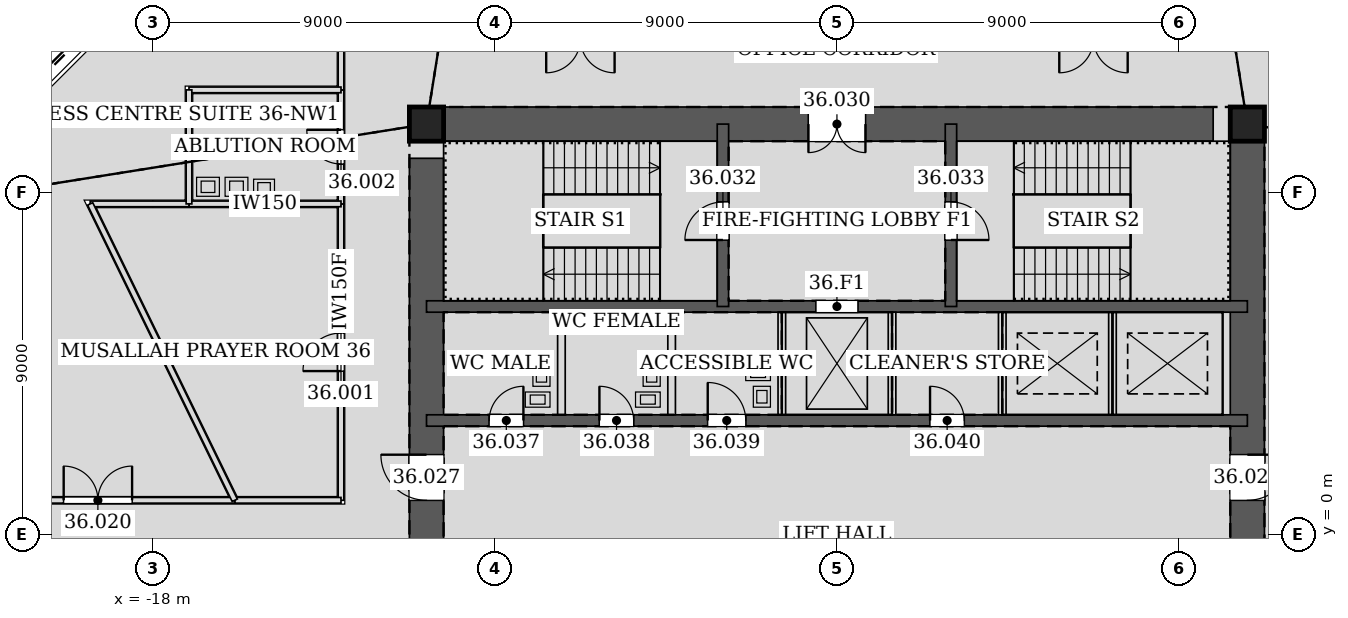
"""IFC4 building model, lengths in metres.
Left out: names, types, materials, properties, quantities, classifications, styles, units other than length and angle.
Written with IfcOpenShell. Run it as: python <this file> out.ifc"""

import sys

from ifc_helpers import new_model, si_unit, direction, frame, frame_2d, origin, origin_2d, place, context, subcontext, project, spatial, rectangle, hollow_rectangle, extrude, element, fill, save


model = new_model("IFC4")
c1 = context("Model", 3, precision=1e-05, world=origin(), true_north=direction((0.0, 1.0)))
c2 = subcontext(c1, "Body", "Model", "MODEL_VIEW")
j1 = project(units=[si_unit("LENGTHUNIT", "METRE"), si_unit("PLANEANGLEUNIT", "RADIAN")], contexts=[c1])
p1 = place(None, origin())
s1 = spatial("IfcSite", under=j1, at=p1, CompositionType="ELEMENT")
p2 = place(p1, origin())
s2 = spatial("IfcBuilding", under=s1, at=p2, CompositionType="ELEMENT")
p3 = place(p2, frame((0.0, 0.0, 159.6)))
s3 = spatial("IfcBuildingStorey", under=s2, at=p3, CompositionType="ELEMENT", Elevation=159.6)
for number, where, z_axis, x_axis in (
    (1, (10.8, 10.8, 0.0), (0.0, 0.0, 1.0), (1.0, 0.0, 0.0)),
    (2, (-10.8, 10.8, 0.0), (0.0, 0.0, 1.0), (1.0, 0.0, 0.0)),
):
    element("IfcColumn", number, at=place(p3, frame(where, z_axis=z_axis, x_axis=x_axis)), inside=s3, PredefinedType="COLUMN", context=c2, shape_type="SweptSolid", body=[
        extrude(hollow_rectangle(XDim=0.9, YDim=0.9, WallThickness=0.06, at=origin_2d()), origin(), (0.0, 0.0, 1.0), 4.2),
    ])
p4 = place(p3, frame((10.8, -10.8, 0.0), z_axis=(0.0, 0.0, 1.0), x_axis=(0.0, 1.0, 0.0)))
e3 = element("IfcWall", 3, at=p4, inside=s3, PredefinedType="SOLIDWALL", context=c2, shape_type="SweptSolid", body=[
    extrude(rectangle(XDim=21.6, YDim=0.9, at=frame_2d((10.8, 0.0))), origin(), (0.0, 0.0, 1.0), 4.2),
])
p5 = place(p4, frame((11.7, 0.0, 0.0)))
e4 = element("IfcOpeningElement", 4, at=p5, cuts=e3, PredefinedType="OPENING", context=c2, shape_type="SweptSolid", body=[
    extrude(rectangle(XDim=1.2, YDim=2.1, at=frame_2d((0.6, 1.05))), frame((0.0, 0.46, 0.0), z_axis=(0.0, -1.0, 0.0), x_axis=(1.0, 0.0, 0.0)), (0.0, 0.0, 1.0), 0.92),
])
p6 = place(p4, frame((8.7, 0.0, 0.0)))
e5 = element("IfcOpeningElement", 5, at=p6, cuts=e3, PredefinedType="OPENING", context=c2, shape_type="SweptSolid", body=[
    extrude(rectangle(XDim=1.2, YDim=2.1, at=frame_2d((0.6, 1.05))), frame((0.0, 0.46, 0.0), z_axis=(0.0, -1.0, 0.0), x_axis=(1.0, 0.0, 0.0)), (0.0, 0.0, 1.0), 0.92),
])
p7 = place(p3, frame((10.8, 10.8, 0.0), z_axis=(0.0, 0.0, 1.0), x_axis=(-1.0, 0.0, 0.0)))
e6 = element("IfcWall", 6, at=p7, inside=s3, PredefinedType="SOLIDWALL", context=c2, shape_type="SweptSolid", body=[
    extrude(rectangle(XDim=21.6, YDim=0.9, at=frame_2d((10.8, 0.0))), origin(), (0.0, 0.0, 1.0), 4.2),
])
p8 = place(p7, frame((10.05, 0.0, 0.0)))
e7 = element("IfcOpeningElement", 7, at=p8, cuts=e6, PredefinedType="OPENING", context=c2, shape_type="SweptSolid", body=[
    extrude(rectangle(XDim=1.5, YDim=2.1, at=frame_2d((0.75, 1.05))), frame((0.0, 0.46, 0.0), z_axis=(0.0, -1.0, 0.0), x_axis=(1.0, 0.0, 0.0)), (0.0, 0.0, 1.0), 0.92),
])
p9 = place(p3, frame((-10.8, 10.8, 0.0), z_axis=(0.0, 0.0, 1.0), x_axis=(0.0, -1.0, 0.0)))
e8 = element("IfcWall", 8, at=p9, inside=s3, PredefinedType="SOLIDWALL", context=c2, shape_type="SweptSolid", body=[
    extrude(rectangle(XDim=21.6, YDim=0.9, at=frame_2d((10.8, 0.0))), origin(), (0.0, 0.0, 1.0), 4.2),
])
p10 = place(p9, frame((8.7, 0.0, 0.0)))
e9 = element("IfcOpeningElement", 9, at=p10, cuts=e8, PredefinedType="OPENING", context=c2, shape_type="SweptSolid", body=[
    extrude(rectangle(XDim=1.2, YDim=2.1, at=frame_2d((0.6, 1.05))), frame((0.0, 0.46, 0.0), z_axis=(0.0, -1.0, 0.0), x_axis=(1.0, 0.0, 0.0)), (0.0, 0.0, 1.0), 0.92),
])
p11 = place(p9, frame((11.7, 0.0, 0.0)))
e10 = element("IfcOpeningElement", 10, at=p11, cuts=e8, PredefinedType="OPENING", context=c2, shape_type="SweptSolid", body=[
    extrude(rectangle(XDim=1.2, YDim=2.1, at=frame_2d((0.6, 1.05))), frame((0.0, 0.46, 0.0), z_axis=(0.0, -1.0, 0.0), x_axis=(1.0, 0.0, 0.0)), (0.0, 0.0, 1.0), 0.92),
])
p12 = place(p3, frame((-10.8, 3.0, 0.0), z_axis=(0.0, 0.0, 1.0), x_axis=(1.0, 0.0, 0.0)))
e11 = element("IfcWall", 11, at=p12, inside=s3, PredefinedType="SOLIDWALL", context=c2, shape_type="SweptSolid", body=[
    extrude(rectangle(XDim=21.6, YDim=0.3, at=frame_2d((10.8, 0.0))), origin(), (0.0, 0.0, 1.0), 4.2),
])
p13 = place(p12, frame((1.65, 0.0, 0.0)))
e12 = element("IfcOpeningElement", 12, at=p13, cuts=e11, PredefinedType="OPENING", context=c2, shape_type="SweptSolid", body=[
    extrude(rectangle(XDim=0.9, YDim=2.1, at=frame_2d((0.45, 1.05))), frame((0.0, 0.16, 0.0), z_axis=(0.0, -1.0, 0.0), x_axis=(1.0, 0.0, 0.0)), (0.0, 0.0, 1.0), 0.32),
])
p14 = place(p12, frame((4.55, 0.0, 0.0)))
e13 = element("IfcOpeningElement", 13, at=p14, cuts=e11, PredefinedType="OPENING", context=c2, shape_type="SweptSolid", body=[
    extrude(rectangle(XDim=0.9, YDim=2.1, at=frame_2d((0.45, 1.05))), frame((0.0, 0.16, 0.0), z_axis=(0.0, -1.0, 0.0), x_axis=(1.0, 0.0, 0.0)), (0.0, 0.0, 1.0), 0.32),
])
p15 = place(p12, frame((7.4, 0.0, 0.0)))
e14 = element("IfcOpeningElement", 14, at=p15, cuts=e11, PredefinedType="OPENING", context=c2, shape_type="SweptSolid", body=[
    extrude(rectangle(XDim=1.0, YDim=2.1, at=frame_2d((0.5, 1.05))), frame((0.0, 0.16, 0.0), z_axis=(0.0, -1.0, 0.0), x_axis=(1.0, 0.0, 0.0)), (0.0, 0.0, 1.0), 0.32),
])
p16 = place(p12, frame((13.25, 0.0, 0.0)))
e15 = element("IfcOpeningElement", 15, at=p16, cuts=e11, PredefinedType="OPENING", context=c2, shape_type="SweptSolid", body=[
    extrude(rectangle(XDim=0.9, YDim=2.1, at=frame_2d((0.45, 1.05))), frame((0.0, 0.16, 0.0), z_axis=(0.0, -1.0, 0.0), x_axis=(1.0, 0.0, 0.0)), (0.0, 0.0, 1.0), 0.32),
])
p17 = place(p3, frame((-10.8, 6.0, 0.0), z_axis=(0.0, 0.0, 1.0), x_axis=(1.0, 0.0, 0.0)))
e16 = element("IfcWall", 16, at=p17, inside=s3, PredefinedType="SOLIDWALL", context=c2, shape_type="SweptSolid", body=[
    extrude(rectangle(XDim=21.6, YDim=0.3, at=frame_2d((10.8, 0.0))), origin(), (0.0, 0.0, 1.0), 4.2),
])
p18 = place(p17, frame((10.25, 0.0, 0.0)))
e17 = element("IfcOpeningElement", 17, at=p18, cuts=e16, PredefinedType="OPENING", context=c2, shape_type="SweptSolid", body=[
    extrude(rectangle(XDim=1.1, YDim=2.1, at=frame_2d((0.55, 1.05))), frame((0.0, 0.16, 0.0), z_axis=(0.0, -1.0, 0.0), x_axis=(1.0, 0.0, 0.0)), (0.0, 0.0, 1.0), 0.32),
])
p19 = place(p3, frame((-3.0, 6.0, 0.0), z_axis=(0.0, 0.0, 1.0), x_axis=(0.0, 1.0, 0.0)))
e18 = element("IfcWall", 18, at=p19, inside=s3, PredefinedType="SOLIDWALL", context=c2, shape_type="SweptSolid", body=[
    extrude(rectangle(XDim=4.8, YDim=0.3, at=frame_2d((2.4, 0.0))), origin(), (0.0, 0.0, 1.0), 4.2),
])
p20 = place(p19, frame((1.75, 0.0, 0.0)))
e19 = element("IfcOpeningElement", 19, at=p20, cuts=e18, PredefinedType="OPENING", context=c2, shape_type="SweptSolid", body=[
    extrude(rectangle(XDim=1.0, YDim=2.1, at=frame_2d((0.5, 1.05))), frame((0.0, 0.16, 0.0), z_axis=(0.0, -1.0, 0.0), x_axis=(1.0, 0.0, 0.0)), (0.0, 0.0, 1.0), 0.32),
])
p21 = place(p3, frame((3.0, 6.0, 0.0), z_axis=(0.0, 0.0, 1.0), x_axis=(0.0, 1.0, 0.0)))
e20 = element("IfcWall", 20, at=p21, inside=s3, PredefinedType="SOLIDWALL", context=c2, shape_type="SweptSolid", body=[
    extrude(rectangle(XDim=4.8, YDim=0.3, at=frame_2d((2.4, 0.0))), origin(), (0.0, 0.0, 1.0), 4.2),
])
p22 = place(p21, frame((1.75, 0.0, 0.0)))
e21 = element("IfcOpeningElement", 21, at=p22, cuts=e20, PredefinedType="OPENING", context=c2, shape_type="SweptSolid", body=[
    extrude(rectangle(XDim=1.0, YDim=2.1, at=frame_2d((0.5, 1.05))), frame((0.0, 0.16, 0.0), z_axis=(0.0, -1.0, 0.0), x_axis=(1.0, 0.0, 0.0)), (0.0, 0.0, 1.0), 0.32),
])
p23 = place(p3, frame((-13.05, 8.701, 0.0), z_axis=(0.0, 0.0, 1.0), x_axis=(0.0, -1.0, 0.0)))
e22 = element("IfcWall", 22, at=p23, inside=s3, PredefinedType="PARTITIONING", context=c2, shape_type="SweptSolid", body=[
    extrude(rectangle(XDim=7.801, YDim=0.15, at=frame_2d((3.9, 0.0))), origin(), (0.0, 0.0, 1.0), 4.035),
])
p24 = place(p23, frame((3.4, 0.0, 0.0)))
e23 = element("IfcOpeningElement", 23, at=p24, cuts=e22, PredefinedType="OPENING", context=c2, shape_type="SweptSolid", body=[
    extrude(rectangle(XDim=1.0, YDim=2.1, at=frame_2d((0.5, 1.05))), frame((0.0, 0.085, 0.0), z_axis=(0.0, -1.0, 0.0), x_axis=(1.0, 0.0, 0.0)), (0.0, 0.0, 1.0), 0.17),
])
p25 = place(p3, frame((-13.05, 0.9, 0.0), z_axis=(0.0, 0.0, 1.0), x_axis=(-1.0, 0.0, 0.0)))
e24 = element("IfcWall", 24, at=p25, inside=s3, PredefinedType="PARTITIONING", context=c2, shape_type="SweptSolid", body=[
    extrude(rectangle(XDim=2.797, YDim=0.15, at=frame_2d((1.398, 0.0))), origin(), (0.0, 0.0, 1.0), 3.491),
])
p26 = place(p3, frame((-13.05, 11.701, 0.0), z_axis=(0.0, 0.0, 1.0), x_axis=(0.0, -1.0, 0.0)))
e25 = element("IfcWall", 25, at=p26, inside=s3, PredefinedType="PARTITIONING", context=c2, shape_type="SweptSolid", body=[
    extrude(rectangle(XDim=3.002, YDim=0.15, at=frame_2d((1.501, 0.0))), origin(), (0.0, 0.0, 1.0), 3.098),
])
p27 = place(p26, frame((1.051, 0.0, 0.0)))
e26 = element("IfcOpeningElement", 26, at=p27, cuts=e25, PredefinedType="OPENING", context=c2, shape_type="SweptSolid", body=[
    extrude(rectangle(XDim=0.9, YDim=2.1, at=frame_2d((0.45, 1.05))), frame((0.0, 0.085, 0.0), z_axis=(0.0, -1.0, 0.0), x_axis=(1.0, 0.0, 0.0)), (0.0, 0.0, 1.0), 0.17),
])
p28 = place(p3, frame((-15.844, 0.9, 0.0), z_axis=(0.0, 0.0, 1.0), x_axis=(-1.0, 0.0, 0.0)))
e27 = element("IfcWall", 27, at=p28, inside=s3, PredefinedType="PARTITIONING", context=c2, shape_type="SweptSolid", body=[
    extrude(rectangle(XDim=7.639, YDim=0.15, at=frame_2d((3.82, 0.0))), origin(), (0.0, 0.0, 1.0), 3.423),
])
p29 = place(p28, frame((2.703, 0.0, 0.0)))
e28 = element("IfcOpeningElement", 28, at=p29, cuts=e27, PredefinedType="OPENING", context=c2, shape_type="SweptSolid", body=[
    extrude(rectangle(XDim=1.8, YDim=2.4, at=frame_2d((0.9, 1.2))), frame((0.0, 0.085, 0.0), z_axis=(0.0, -1.0, 0.0), x_axis=(1.0, 0.0, 0.0)), (0.0, 0.0, 1.0), 0.17),
])
p30 = place(p3, frame((-13.05, 13.05, 0.0), z_axis=(0.0, 0.0, 1.0), x_axis=(0.0, -1.0, 0.0)))
e29 = element("IfcWall", 29, at=p30, inside=s3, PredefinedType="PARTITIONING", context=c2, shape_type="SweptSolid", body=[
    extrude(rectangle(XDim=1.351, YDim=0.15, at=frame_2d((0.676, 0.0))), origin(), (0.0, 0.0, 1.0), 3.332),
])
p31 = place(p3, frame((-13.05, 8.7, 0.0), z_axis=(0.0, 0.0, 1.0), x_axis=(-1.0, 0.0, 0.0)))
e30 = element("IfcWall", 30, at=p31, inside=s3, PredefinedType="PARTITIONING", context=c2, shape_type="SweptSolid", body=[
    extrude(rectangle(XDim=4.001, YDim=0.15, at=frame_2d((2.0, 0.0))), origin(), (0.0, 0.0, 1.0), 3.491),
])
p32 = place(p3, frame((-17.049, 8.7, 0.0), z_axis=(0.0, 0.0, 1.0), x_axis=(-1.0, 0.0, 0.0)))
e31 = element("IfcWall", 31, at=p32, inside=s3, PredefinedType="PARTITIONING", context=c2, shape_type="SweptSolid", body=[
    extrude(rectangle(XDim=2.601, YDim=0.15, at=frame_2d((1.3, 0.0))), origin(), (0.0, 0.0, 1.0), 3.423),
])
p33 = place(p3, frame((-19.65, 8.7, 0.0), z_axis=(0.0, 0.0, 1.0), x_axis=(0.438358227548, -0.898800347319, 0.0)))
e32 = element("IfcWall", 32, at=p33, inside=s3, PredefinedType="PARTITIONING", context=c2, shape_type="SweptSolid", body=[
    extrude(rectangle(XDim=8.678, YDim=0.15, at=frame_2d((4.339, 0.0))), origin(), (0.0, 0.0, 1.0), 3.423),
])
p34 = place(p3, frame((-13.05, 11.7, 0.0), z_axis=(0.0, 0.0, 1.0), x_axis=(-1.0, 0.0, 0.0)))
e33 = element("IfcWall", 33, at=p34, inside=s3, PredefinedType="PARTITIONING", context=c2, shape_type="SweptSolid", body=[
    extrude(rectangle(XDim=4.0, YDim=0.15, at=frame_2d((2.0, 0.0))), origin(), (0.0, 0.0, 1.0), 3.499),
])
p35 = place(p3, frame((-17.05, 11.7, 0.0), z_axis=(0.0, 0.0, 1.0), x_axis=(0.0, -1.0, 0.0)))
e34 = element("IfcWall", 34, at=p35, inside=s3, PredefinedType="PARTITIONING", context=c2, shape_type="SweptSolid", body=[
    extrude(rectangle(XDim=3.0, YDim=0.15, at=frame_2d((1.5, 0.0))), origin(), (0.0, 0.0, 1.0), 3.098),
])
for number, where, z_axis, x_axis in (
    (35, (-7.25, 3.15, 0.0), (0.0, 0.0, 1.0), (0.0, 1.0, 0.0)),
    (36, (-4.35, 3.15, 0.0), (0.0, 0.0, 1.0), (0.0, 1.0, 0.0)),
    (37, (-1.45, 3.15, 0.0), (0.0, 0.0, 1.0), (0.0, 1.0, 0.0)),
    (38, (1.45, 3.15, 0.0), (0.0, 0.0, 1.0), (0.0, 1.0, 0.0)),
    (39, (4.35, 3.15, 0.0), (0.0, 0.0, 1.0), (0.0, 1.0, 0.0)),
):
    element("IfcWall", number, at=place(p3, frame(where, z_axis=z_axis, x_axis=x_axis)), inside=s3, PredefinedType="PARTITIONING", context=c2, shape_type="SweptSolid", body=[
        extrude(rectangle(XDim=2.7, YDim=0.2, at=frame_2d((1.35, 0.0))), origin(), (0.0, 0.0, 1.0), 4.035),
    ])
p36 = place(p3, frame((7.25, 3.15, 0.0), z_axis=(0.0, 0.0, 1.0), x_axis=(0.0, 1.0, 0.0)))
e40 = element("IfcWall", 40, at=p36, inside=s3, PredefinedType="PARTITIONING", context=c2, shape_type="SweptSolid", body=[
    extrude(rectangle(XDim=2.7, YDim=0.2, at=frame_2d((1.35, 0.0))), origin(), (0.0, 0.0, 1.0), 4.2),
])
p37 = place(p24, frame((1.0, 0.0, 0.0), z_axis=(0.0, 0.0, 1.0), x_axis=(-1.0, 0.0, 0.0)))
e41 = element("IfcDoor", 41, at=p37, inside=s3, OperationType="SINGLE_SWING_LEFT", PredefinedType="DOOR", context=c2, shape_type="SweptSolid", body=[
    extrude(rectangle(XDim=1.0, YDim=2.1, at=frame_2d((0.5, 1.05))), frame((0.0, 0.025, 0.0), z_axis=(0.0, -1.0, 0.0), x_axis=(1.0, 0.0, 0.0)), (0.0, 0.0, 1.0), 0.05),
])
fill(e23, e41)
p38 = place(p27, frame((0.9, 0.0, 0.0), z_axis=(0.0, 0.0, 1.0), x_axis=(-1.0, 0.0, 0.0)))
e42 = element("IfcDoor", 42, at=p38, inside=s3, OperationType="SINGLE_SWING_RIGHT", PredefinedType="DOOR", context=c2, shape_type="SweptSolid", body=[
    extrude(rectangle(XDim=0.9, YDim=2.1, at=frame_2d((0.45, 1.05))), frame((0.0, 0.025, 0.0), z_axis=(0.0, -1.0, 0.0), x_axis=(1.0, 0.0, 0.0)), (0.0, 0.0, 1.0), 0.05),
])
fill(e26, e42)
p39 = place(p29, frame((1.8, 0.0, 0.0), z_axis=(0.0, 0.0, 1.0), x_axis=(-1.0, 0.0, 0.0)))
e43 = element("IfcDoor", 43, at=p39, inside=s3, OperationType="DOUBLE_DOOR_SINGLE_SWING", PredefinedType="DOOR", context=c2, shape_type="SweptSolid", body=[
    extrude(rectangle(XDim=1.8, YDim=2.4, at=frame_2d((0.9, 1.2))), frame((0.0, 0.025, 0.0), z_axis=(0.0, -1.0, 0.0), x_axis=(1.0, 0.0, 0.0)), (0.0, 0.0, 1.0), 0.05),
])
fill(e28, e43)
p40 = place(p5, frame((1.2, 0.0, 0.0), z_axis=(0.0, 0.0, 1.0), x_axis=(-1.0, 0.0, 0.0)))
e44 = element("IfcDoor", 44, at=p40, inside=s3, OperationType="SINGLE_SWING_LEFT", PredefinedType="DOOR", context=c2, shape_type="SweptSolid", body=[
    extrude(rectangle(XDim=1.2, YDim=2.1, at=frame_2d((0.6, 1.05))), frame((0.0, 0.025, 0.0), z_axis=(0.0, -1.0, 0.0), x_axis=(1.0, 0.0, 0.0)), (0.0, 0.0, 1.0), 0.05),
])
fill(e4, e44)
p41 = place(p10, frame((1.2, 0.0, 0.0), z_axis=(0.0, 0.0, 1.0), x_axis=(-1.0, 0.0, 0.0)))
e45 = element("IfcDoor", 45, at=p41, inside=s3, OperationType="SINGLE_SWING_RIGHT", PredefinedType="DOOR", context=c2, shape_type="SweptSolid", body=[
    extrude(rectangle(XDim=1.2, YDim=2.1, at=frame_2d((0.6, 1.05))), frame((0.0, 0.025, 0.0), z_axis=(0.0, -1.0, 0.0), x_axis=(1.0, 0.0, 0.0)), (0.0, 0.0, 1.0), 0.05),
])
fill(e9, e45)
p42 = place(p8, origin())
e46 = element("IfcDoor", 46, at=p42, inside=s3, OperationType="DOUBLE_DOOR_SINGLE_SWING", PredefinedType="DOOR", context=c2, shape_type="SweptSolid", body=[
    extrude(rectangle(XDim=1.5, YDim=2.1, at=frame_2d((0.75, 1.05))), frame((0.0, 0.025, 0.0), z_axis=(0.0, -1.0, 0.0), x_axis=(1.0, 0.0, 0.0)), (0.0, 0.0, 1.0), 0.05),
])
fill(e7, e46)
p43 = place(p20, origin())
e47 = element("IfcDoor", 47, at=p43, inside=s3, OperationType="SINGLE_SWING_LEFT", PredefinedType="DOOR", context=c2, shape_type="SweptSolid", body=[
    extrude(rectangle(XDim=1.0, YDim=2.1, at=frame_2d((0.5, 1.05))), frame((0.0, 0.025, 0.0), z_axis=(0.0, -1.0, 0.0), x_axis=(1.0, 0.0, 0.0)), (0.0, 0.0, 1.0), 0.05),
])
fill(e19, e47)
p44 = place(p22, frame((1.0, 0.0, 0.0), z_axis=(0.0, 0.0, 1.0), x_axis=(-1.0, 0.0, 0.0)))
e48 = element("IfcDoor", 48, at=p44, inside=s3, OperationType="SINGLE_SWING_RIGHT", PredefinedType="DOOR", context=c2, shape_type="SweptSolid", body=[
    extrude(rectangle(XDim=1.0, YDim=2.1, at=frame_2d((0.5, 1.05))), frame((0.0, 0.025, 0.0), z_axis=(0.0, -1.0, 0.0), x_axis=(1.0, 0.0, 0.0)), (0.0, 0.0, 1.0), 0.05),
])
fill(e21, e48)
p45 = place(p13, origin())
e49 = element("IfcDoor", 49, at=p45, inside=s3, OperationType="SINGLE_SWING_RIGHT", PredefinedType="DOOR", context=c2, shape_type="SweptSolid", body=[
    extrude(rectangle(XDim=0.9, YDim=2.1, at=frame_2d((0.45, 1.05))), frame((0.0, 0.025, 0.0), z_axis=(0.0, -1.0, 0.0), x_axis=(1.0, 0.0, 0.0)), (0.0, 0.0, 1.0), 0.05),
])
fill(e12, e49)
p46 = place(p14, origin())
e50 = element("IfcDoor", 50, at=p46, inside=s3, OperationType="SINGLE_SWING_LEFT", PredefinedType="DOOR", context=c2, shape_type="SweptSolid", body=[
    extrude(rectangle(XDim=0.9, YDim=2.1, at=frame_2d((0.45, 1.05))), frame((0.0, 0.025, 0.0), z_axis=(0.0, -1.0, 0.0), x_axis=(1.0, 0.0, 0.0)), (0.0, 0.0, 1.0), 0.05),
])
fill(e13, e50)
p47 = place(p15, origin())
e51 = element("IfcDoor", 51, at=p47, inside=s3, OperationType="SINGLE_SWING_LEFT", PredefinedType="DOOR", context=c2, shape_type="SweptSolid", body=[
    extrude(rectangle(XDim=1.0, YDim=2.1, at=frame_2d((0.5, 1.05))), frame((0.0, 0.025, 0.0), z_axis=(0.0, -1.0, 0.0), x_axis=(1.0, 0.0, 0.0)), (0.0, 0.0, 1.0), 0.05),
])
fill(e14, e51)
p48 = place(p16, origin())
e52 = element("IfcDoor", 52, at=p48, inside=s3, OperationType="SINGLE_SWING_LEFT", PredefinedType="DOOR", context=c2, shape_type="SweptSolid", body=[
    extrude(rectangle(XDim=0.9, YDim=2.1, at=frame_2d((0.45, 1.05))), frame((0.0, 0.025, 0.0), z_axis=(0.0, -1.0, 0.0), x_axis=(1.0, 0.0, 0.0)), (0.0, 0.0, 1.0), 0.05),
])
fill(e15, e52)
p49 = place(p18, origin())
e53 = element("IfcDoor", 53, at=p49, inside=s3, OperationType="DOUBLE_DOOR_SLIDING", PredefinedType="DOOR", context=c2, shape_type="SweptSolid", body=[
    extrude(rectangle(XDim=1.1, YDim=2.1, at=frame_2d((0.55, 1.05))), frame((0.0, 0.025, 0.0), z_axis=(0.0, -1.0, 0.0), x_axis=(1.0, 0.0, 0.0)), (0.0, 0.0, 1.0), 0.05),
])
fill(e17, e53)
save(model, sys.argv[1])
